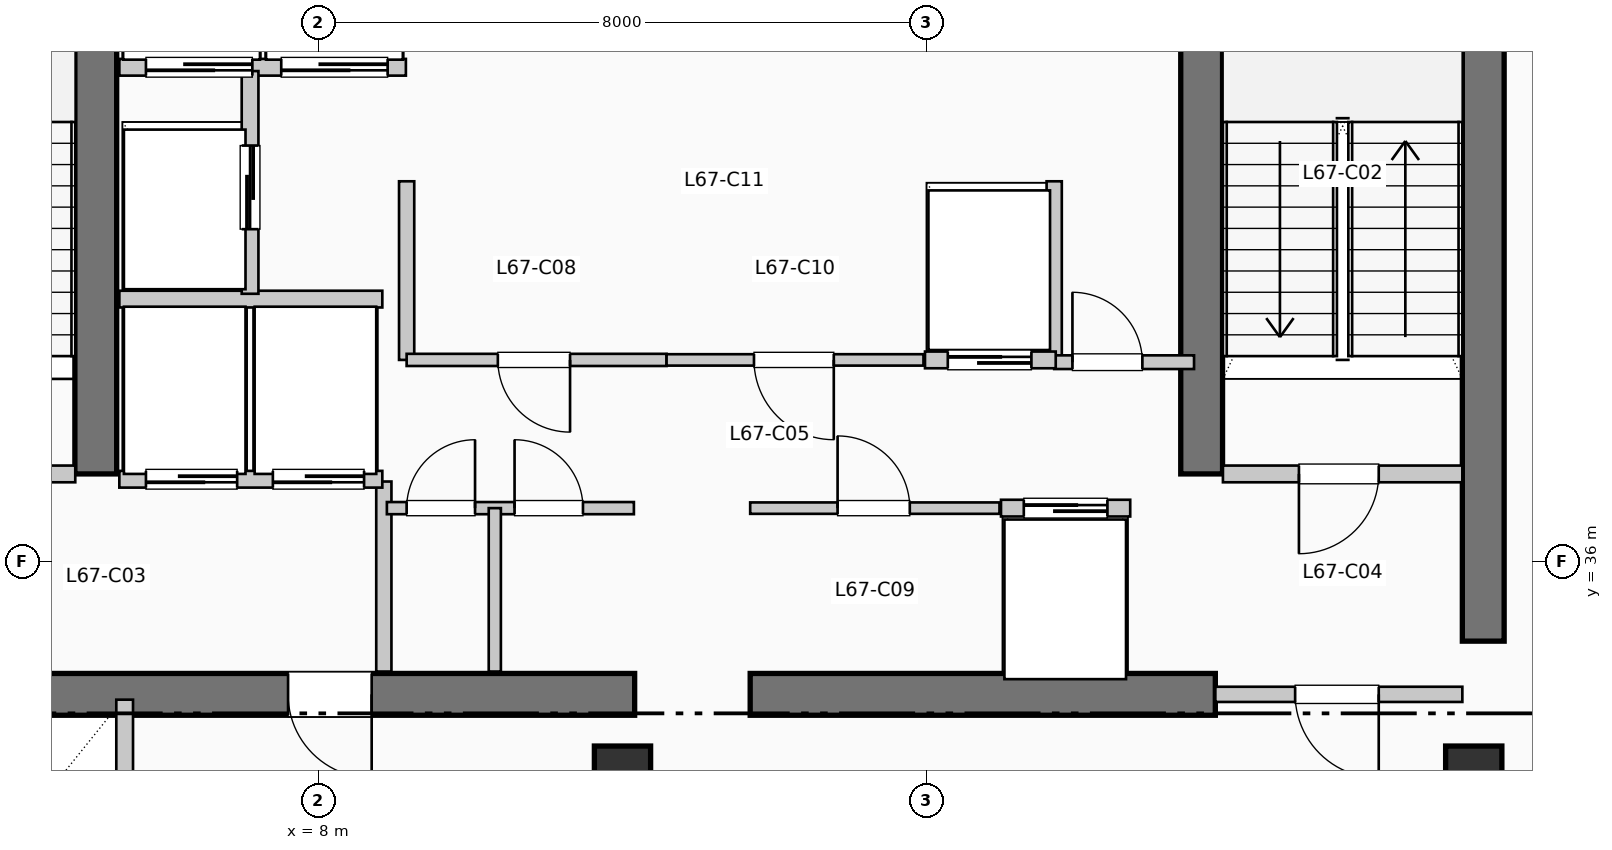
"""IFC4 building model, lengths in metres.
Left out: names, types, materials, properties, quantities, classifications, styles, units other than length and angle.
Written with IfcOpenShell. Run it as: python <this file> out.ifc"""

import sys

from ifc_helpers import new_model, si_unit, direction, frame, frame_2d, origin, origin_2d, place, context, subcontext, project, spatial, rectangle, extrude, element, fill, save


model = new_model("IFC4")
c1 = context("Model", 3, precision=1e-05, world=origin(), true_north=direction((0.0, 1.0)))
c2 = subcontext(c1, "Body", "Model", "MODEL_VIEW")
j1 = project(units=[si_unit("LENGTHUNIT", "METRE"), si_unit("PLANEANGLEUNIT", "RADIAN")], contexts=[c1])
p1 = place(None, origin())
s1 = spatial("IfcSite", under=j1, at=p1, CompositionType="ELEMENT")
p2 = place(p1, origin())
s2 = spatial("IfcBuilding", under=s1, at=p2, CompositionType="ELEMENT")
p3 = place(p2, frame((0.0, 0.0, 276.21)))
s3 = spatial("IfcBuildingStorey", under=s2, at=p3, CompositionType="ELEMENT", Elevation=276.21)
p4 = place(p3, frame((23.325, 34.95, 0.0), z_axis=(0.0, 0.0, 1.0), x_axis=(0.0, 1.0, 0.0)))
e1 = element("IfcWall", 1, at=p4, inside=s3, PredefinedType="SHEAR", context=c2, shape_type="SweptSolid", body=[
    extrude(rectangle(XDim=10.64, YDim=0.55, at=frame_2d((5.32, 0.0))), origin(), (0.0, 0.0, 1.0), 3.96),
])
p5 = place(p3, frame((1.45, 34.25, 0.0), z_axis=(0.0, 0.0, 1.0), x_axis=(1.0, 0.0, 0.0)))
e2 = element("IfcWall", 2, at=p5, inside=s3, PredefinedType="SHEAR", context=c2, shape_type="SweptSolid", body=[
    extrude(rectangle(XDim=10.71, YDim=0.55, at=frame_2d((5.355, 0.0))), origin(), (0.0, 0.0, 1.0), 3.96),
])
p6 = place(p5, frame((7.25, 0.0, 0.0), z_axis=(0.0, 0.0, 1.0), x_axis=(-1.0, 0.0, 0.0)))
e3 = element("IfcOpeningElement", 3, at=p6, cuts=e2, PredefinedType="OPENING", context=c2, shape_type="SweptSolid", body=[
    extrude(rectangle(XDim=1.1, YDim=2.15, at=frame_2d((0.55, 1.075))), frame((0.0, 0.285, 0.0), z_axis=(0.0, -1.0, 0.0), x_axis=(1.0, 0.0, 0.0)), (0.0, 0.0, 1.0), 0.57),
])
p7 = place(p3, frame((13.68, 34.25, 0.0), z_axis=(0.0, 0.0, 1.0), x_axis=(1.0, 0.0, 0.0)))
e4 = element("IfcWall", 4, at=p7, inside=s3, PredefinedType="SHEAR", context=c2, shape_type="SweptSolid", body=[
    extrude(rectangle(XDim=6.12, YDim=0.55, at=frame_2d((3.06, 0.0))), origin(), (0.0, 0.0, 1.0), 3.96),
])
for number, where, z_axis, x_axis in (
    (5, (5.07, 37.15, 0.0), (0.0, 0.0, 1.0), (0.0, 1.0, 0.0)),
    (6, (19.62, 37.15, 0.0), (0.0, 0.0, 1.0), (0.0, 1.0, 0.0)),
):
    element("IfcWall", number, at=place(p3, frame(where, z_axis=z_axis, x_axis=x_axis)), inside=s3, PredefinedType="SHEAR", context=c2, shape_type="SweptSolid", body=[
        extrude(rectangle(XDim=7.89, YDim=0.55, at=frame_2d((3.945, 0.0))), origin(), (0.0, 0.0, 1.0), 3.96),
    ])
for number, where, z_axis, x_axis in (
    (7, (12.0, 33.2, 0.0), (0.0, 0.0, 1.0), (1.0, 0.0, 0.0)),
    (8, (23.2, 33.2, 0.0), (0.0, 0.0, 1.0), (1.0, 0.0, 0.0)),
):
    element("IfcColumn", number, at=place(p3, frame(where, z_axis=z_axis, x_axis=x_axis)), inside=s3, PredefinedType="COLUMN", context=c2, shape_type="SweptSolid", body=[
        extrude(rectangle(XDim=0.74, YDim=0.74, at=origin_2d()), origin(), (0.0, 0.0, 1.0), 3.96),
    ])
p8 = place(p3, frame((1.65, 37.15, 0.0), z_axis=(0.0, 0.0, 1.0), x_axis=(1.0, 0.0, 0.0)))
e9 = element("IfcWall", 9, at=p8, inside=s3, PredefinedType="PARTITIONING", context=c2, shape_type="SweptSolid", body=[
    extrude(rectangle(XDim=3.15, YDim=0.22, at=frame_2d((1.575, 0.0))), origin(), (0.0, 0.0, 1.0), 3.74),
])
p9 = place(p8, frame((2.05, 0.0, 0.0), z_axis=(0.0, 0.0, 1.0), x_axis=(-1.0, 0.0, 0.0)))
e10 = element("IfcOpeningElement", 10, at=p9, cuts=e9, PredefinedType="OPENING", context=c2, shape_type="SweptSolid", body=[
    extrude(rectangle(XDim=1.05, YDim=2.15, at=frame_2d((0.525, 1.075))), frame((0.0, 0.12, 0.0), z_axis=(0.0, -1.0, 0.0), x_axis=(1.0, 0.0, 0.0)), (0.0, 0.0, 1.0), 0.24),
])
p10 = place(p3, frame((8.86, 34.55, 0.0), z_axis=(0.0, 0.0, 1.0), x_axis=(0.0, 1.0, 0.0)))
e11 = element("IfcWall", 11, at=p10, inside=s3, PredefinedType="PARTITIONING", context=c2, shape_type="SweptSolid", body=[
    extrude(rectangle(XDim=2.5, YDim=0.2, at=frame_2d((1.25, 0.0))), origin(), (0.0, 0.0, 1.0), 3.74),
])
p11 = place(p3, frame((19.9, 37.15, 0.0), z_axis=(0.0, 0.0, 1.0), x_axis=(1.0, 0.0, 0.0)))
e12 = element("IfcWall", 12, at=p11, inside=s3, PredefinedType="PARTITIONING", context=c2, shape_type="SweptSolid", body=[
    extrude(rectangle(XDim=3.15, YDim=0.22, at=frame_2d((1.575, 0.0))), origin(), (0.0, 0.0, 1.0), 3.74),
])
p12 = place(p11, frame((2.05, 0.0, 0.0), z_axis=(0.0, 0.0, 1.0), x_axis=(-1.0, 0.0, 0.0)))
e13 = element("IfcOpeningElement", 13, at=p12, cuts=e12, PredefinedType="OPENING", context=c2, shape_type="SweptSolid", body=[
    extrude(rectangle(XDim=1.05, YDim=2.15, at=frame_2d((0.525, 1.075))), frame((0.0, 0.12, 0.0), z_axis=(0.0, -1.0, 0.0), x_axis=(1.0, 0.0, 0.0)), (0.0, 0.0, 1.0), 0.24),
])
p13 = place(p3, frame((19.8, 34.25, 0.0), z_axis=(0.0, 0.0, 1.0), x_axis=(1.0, 0.0, 0.0)))
e14 = element("IfcWall", 14, at=p13, inside=s3, PredefinedType="PARTITIONING", context=c2, shape_type="SweptSolid", body=[
    extrude(rectangle(XDim=3.25, YDim=0.2, at=frame_2d((1.625, 0.0))), origin(), (0.0, 0.0, 1.0), 3.74),
])
p14 = place(p13, frame((2.15, 0.0, 0.0), z_axis=(0.0, 0.0, 1.0), x_axis=(-1.0, 0.0, 0.0)))
e15 = element("IfcOpeningElement", 15, at=p14, cuts=e14, PredefinedType="OPENING", context=c2, shape_type="SweptSolid", body=[
    extrude(rectangle(XDim=1.1, YDim=2.15, at=frame_2d((0.55, 1.075))), frame((0.0, 0.11, 0.0), z_axis=(0.0, -1.0, 0.0), x_axis=(1.0, 0.0, 0.0)), (0.0, 0.0, 1.0), 0.22),
])
p15 = place(p3, frame((5.38, 37.08, 0.0), z_axis=(0.0, 0.0, 1.0), x_axis=(1.0, 0.0, 0.0)))
e16 = element("IfcWall", 16, at=p15, inside=s3, PredefinedType="PARTITIONING", context=c2, shape_type="SweptSolid", body=[
    extrude(rectangle(XDim=3.46, YDim=0.22, at=frame_2d((1.73, 0.0))), origin(), (0.0, 0.0, 1.0), 3.74),
])
p16 = place(p15, frame((1.55, 0.0, 0.0), z_axis=(0.0, 0.0, 1.0), x_axis=(-1.0, 0.0, 0.0)))
e17 = element("IfcOpeningElement", 17, at=p16, cuts=e16, PredefinedType="OPENING", context=c2, shape_type="SweptSolid", body=[
    extrude(rectangle(XDim=1.2, YDim=2.2, at=frame_2d((0.6, 1.1))), frame((0.0, 0.12, 0.0), z_axis=(0.0, -1.0, 0.0), x_axis=(1.0, 0.0, 0.0)), (0.0, 0.0, 1.0), 0.24),
])
p17 = place(p15, frame((3.22, 0.0, 0.0), z_axis=(0.0, 0.0, 1.0), x_axis=(-1.0, 0.0, 0.0)))
e18 = element("IfcOpeningElement", 18, at=p17, cuts=e16, PredefinedType="OPENING", context=c2, shape_type="SweptSolid", body=[
    extrude(rectangle(XDim=1.2, YDim=2.2, at=frame_2d((0.6, 1.1))), frame((0.0, 0.12, 0.0), z_axis=(0.0, -1.0, 0.0), x_axis=(1.0, 0.0, 0.0)), (0.0, 0.0, 1.0), 0.24),
])
p18 = place(p3, frame((5.38, 39.45, 0.0), z_axis=(0.0, 0.0, 1.0), x_axis=(1.0, 0.0, 0.0)))
e19 = element("IfcWall", 19, at=p18, inside=s3, PredefinedType="PARTITIONING", context=c2, shape_type="SweptSolid", body=[
    extrude(rectangle(XDim=3.46, YDim=0.22, at=frame_2d((1.73, 0.0))), origin(), (0.0, 0.0, 1.0), 3.74),
])
p19 = place(p3, frame((5.38, 42.5, 0.0), z_axis=(0.0, 0.0, 1.0), x_axis=(1.0, 0.0, 0.0)))
e20 = element("IfcWall", 20, at=p19, inside=s3, PredefinedType="PARTITIONING", context=c2, shape_type="SweptSolid", body=[
    extrude(rectangle(XDim=3.77, YDim=0.22, at=frame_2d((1.885, 0.0))), origin(), (0.0, 0.0, 1.0), 3.74),
])
p20 = place(p19, frame((1.75, 0.0, 0.0), z_axis=(0.0, 0.0, 1.0), x_axis=(-1.0, 0.0, 0.0)))
e21 = element("IfcOpeningElement", 21, at=p20, cuts=e20, PredefinedType="OPENING", context=c2, shape_type="SweptSolid", body=[
    extrude(rectangle(XDim=1.4, YDim=2.2, at=frame_2d((0.7, 1.1))), frame((0.0, 0.12, 0.0), z_axis=(0.0, -1.0, 0.0), x_axis=(1.0, 0.0, 0.0)), (0.0, 0.0, 1.0), 0.24),
])
p21 = place(p19, frame((3.53, 0.0, 0.0), z_axis=(0.0, 0.0, 1.0), x_axis=(-1.0, 0.0, 0.0)))
e22 = element("IfcOpeningElement", 22, at=p21, cuts=e20, PredefinedType="OPENING", context=c2, shape_type="SweptSolid", body=[
    extrude(rectangle(XDim=1.4, YDim=2.2, at=frame_2d((0.7, 1.1))), frame((0.0, 0.12, 0.0), z_axis=(0.0, -1.0, 0.0), x_axis=(1.0, 0.0, 0.0)), (0.0, 0.0, 1.0), 0.24),
])
p22 = place(p3, frame((7.1, 39.52, 0.0), z_axis=(0.0, 0.0, 1.0), x_axis=(0.0, 1.0, 0.0)))
e23 = element("IfcWall", 23, at=p22, inside=s3, PredefinedType="PARTITIONING", context=c2, shape_type="SweptSolid", body=[
    extrude(rectangle(XDim=2.93, YDim=0.22, at=frame_2d((1.465, 0.0))), origin(), (0.0, 0.0, 1.0), 3.74),
])
p23 = place(p22, frame((0.85, 0.0, 0.0)))
e24 = element("IfcOpeningElement", 24, at=p23, cuts=e23, PredefinedType="OPENING", context=c2, shape_type="SweptSolid", body=[
    extrude(rectangle(XDim=1.1, YDim=2.2, at=frame_2d((0.55, 1.1))), frame((0.0, 0.12, 0.0), z_axis=(0.0, -1.0, 0.0), x_axis=(1.0, 0.0, 0.0)), (0.0, 0.0, 1.0), 0.24),
])
p24 = place(p3, frame((5.45, 31.8, 0.0), z_axis=(0.0, 0.0, 1.0), x_axis=(0.0, 1.0, 0.0)))
e25 = element("IfcWall", 25, at=p24, inside=s3, PredefinedType="PARTITIONING", context=c2, shape_type="SweptSolid", body=[
    extrude(rectangle(XDim=2.38, YDim=0.22, at=frame_2d((1.19, 0.0))), origin(), (0.0, 0.0, 1.0), 3.74),
])
for number, where, z_axis, x_axis in (
    (26, (9.16, 38.65, 0.0), (0.0, 0.0, 1.0), (0.0, 1.0, 0.0)),
    (27, (17.68, 38.65, 0.0), (0.0, 0.0, 1.0), (0.0, 1.0, 0.0)),
):
    element("IfcWall", number, at=place(p3, frame(where, z_axis=z_axis, x_axis=x_axis)), inside=s3, PredefinedType="PARTITIONING", context=c2, shape_type="SweptSolid", body=[
        extrude(rectangle(XDim=2.35, YDim=0.2, at=frame_2d((1.175, 0.0))), origin(), (0.0, 0.0, 1.0), 3.74),
    ])
p25 = place(p3, frame((17.68, 38.62, 0.0), z_axis=(0.0, 0.0, 1.0), x_axis=(1.0, 0.0, 0.0)))
e28 = element("IfcWall", 28, at=p25, inside=s3, PredefinedType="PARTITIONING", context=c2, shape_type="SweptSolid", body=[
    extrude(rectangle(XDim=1.84, YDim=0.18, at=frame_2d((0.92, 0.0))), origin(), (0.0, 0.0, 1.0), 3.74),
])
p26 = place(p25, frame((0.24, 0.0, 0.0)))
e29 = element("IfcOpeningElement", 29, at=p26, cuts=e28, PredefinedType="OPENING", context=c2, shape_type="SweptSolid", body=[
    extrude(rectangle(XDim=0.92, YDim=2.1, at=frame_2d((0.46, 1.05))), frame((0.0, 0.1, 0.0), z_axis=(0.0, -1.0, 0.0), x_axis=(1.0, 0.0, 0.0)), (0.0, 0.0, 1.0), 0.2),
])
p27 = place(p3, frame((8.9, 36.7, 0.0), z_axis=(0.0, 0.0, 1.0), x_axis=(1.0, 0.0, 0.0)))
e30 = element("IfcWall", 30, at=p27, inside=s3, PredefinedType="PARTITIONING", context=c2, shape_type="SweptSolid", body=[
    extrude(rectangle(XDim=3.25, YDim=0.16, at=frame_2d((1.625, 0.0))), origin(), (0.0, 0.0, 1.0), 3.74),
])
p28 = place(p27, frame((0.26, 0.0, 0.0)))
e31 = element("IfcOpeningElement", 31, at=p28, cuts=e30, PredefinedType="OPENING", context=c2, shape_type="SweptSolid", body=[
    extrude(rectangle(XDim=0.9, YDim=2.15, at=frame_2d((0.45, 1.075))), frame((0.0, 0.09, 0.0), z_axis=(0.0, -1.0, 0.0), x_axis=(1.0, 0.0, 0.0)), (0.0, 0.0, 1.0), 0.18),
])
p29 = place(p27, frame((1.68, 0.0, 0.0)))
e32 = element("IfcOpeningElement", 32, at=p29, cuts=e30, PredefinedType="OPENING", context=c2, shape_type="SweptSolid", body=[
    extrude(rectangle(XDim=0.9, YDim=2.15, at=frame_2d((0.45, 1.075))), frame((0.0, 0.09, 0.0), z_axis=(0.0, -1.0, 0.0), x_axis=(1.0, 0.0, 0.0)), (0.0, 0.0, 1.0), 0.18),
])
p30 = place(p3, frame((10.32, 34.55, 0.0), z_axis=(0.0, 0.0, 1.0), x_axis=(0.0, 1.0, 0.0)))
e33 = element("IfcWall", 33, at=p30, inside=s3, PredefinedType="PARTITIONING", context=c2, shape_type="SweptSolid", body=[
    extrude(rectangle(XDim=2.15, YDim=0.16, at=frame_2d((1.075, 0.0))), origin(), (0.0, 0.0, 1.0), 3.74),
])
p31 = place(p3, frame((9.16, 38.65, 0.0), z_axis=(0.0, 0.0, 1.0), x_axis=(1.0, 0.0, 0.0)))
e34 = element("IfcWall", 34, at=p31, inside=s3, PredefinedType="PARTITIONING", context=c2, shape_type="SweptSolid", body=[
    extrude(rectangle(XDim=3.42, YDim=0.16, at=frame_2d((1.71, 0.0))), origin(), (0.0, 0.0, 1.0), 3.74),
])
p32 = place(p31, frame((2.15, 0.0, 0.0), z_axis=(0.0, 0.0, 1.0), x_axis=(-1.0, 0.0, 0.0)))
e35 = element("IfcOpeningElement", 35, at=p32, cuts=e34, PredefinedType="OPENING", context=c2, shape_type="SweptSolid", body=[
    extrude(rectangle(XDim=0.95, YDim=2.15, at=frame_2d((0.475, 1.075))), frame((0.0, 0.09, 0.0), z_axis=(0.0, -1.0, 0.0), x_axis=(1.0, 0.0, 0.0)), (0.0, 0.0, 1.0), 0.18),
])
p33 = place(p3, frame((13.68, 36.7, 0.0), z_axis=(0.0, 0.0, 1.0), x_axis=(1.0, 0.0, 0.0)))
e36 = element("IfcWall", 36, at=p33, inside=s3, PredefinedType="PARTITIONING", context=c2, shape_type="SweptSolid", body=[
    extrude(rectangle(XDim=3.28, YDim=0.15, at=frame_2d((1.64, 0.0))), origin(), (0.0, 0.0, 1.0), 3.74),
])
p34 = place(p33, frame((1.15, 0.0, 0.0)))
e37 = element("IfcOpeningElement", 37, at=p34, cuts=e36, PredefinedType="OPENING", context=c2, shape_type="SweptSolid", body=[
    extrude(rectangle(XDim=0.95, YDim=2.15, at=frame_2d((0.475, 1.075))), frame((0.0, 0.085, 0.0), z_axis=(0.0, -1.0, 0.0), x_axis=(1.0, 0.0, 0.0)), (0.0, 0.0, 1.0), 0.17),
])
p35 = place(p3, frame((12.58, 38.65, 0.0), z_axis=(0.0, 0.0, 1.0), x_axis=(1.0, 0.0, 0.0)))
e38 = element("IfcWall", 38, at=p35, inside=s3, PredefinedType="PARTITIONING", context=c2, shape_type="SweptSolid", body=[
    extrude(rectangle(XDim=3.38, YDim=0.15, at=frame_2d((1.69, 0.0))), origin(), (0.0, 0.0, 1.0), 3.74),
])
p36 = place(p35, frame((2.2, 0.0, 0.0), z_axis=(0.0, 0.0, 1.0), x_axis=(-1.0, 0.0, 0.0)))
e39 = element("IfcOpeningElement", 39, at=p36, cuts=e38, PredefinedType="OPENING", context=c2, shape_type="SweptSolid", body=[
    extrude(rectangle(XDim=1.05, YDim=2.15, at=frame_2d((0.525, 1.075))), frame((0.0, 0.085, 0.0), z_axis=(0.0, -1.0, 0.0), x_axis=(1.0, 0.0, 0.0)), (0.0, 0.0, 1.0), 0.17),
])
p37 = place(p3, frame((16.98, 36.7, 0.0), z_axis=(0.0, 0.0, 1.0), x_axis=(1.0, 0.0, 0.0)))
e40 = element("IfcWall", 40, at=p37, inside=s3, PredefinedType="PARTITIONING", context=c2, shape_type="SweptSolid", body=[
    extrude(rectangle(XDim=1.7, YDim=0.22, at=frame_2d((0.85, 0.0))), origin(), (0.0, 0.0, 1.0), 3.74),
])
p38 = place(p37, frame((0.3, 0.0, 0.0)))
e41 = element("IfcOpeningElement", 41, at=p38, cuts=e40, PredefinedType="OPENING", context=c2, shape_type="SweptSolid", body=[
    extrude(rectangle(XDim=1.1, YDim=2.2, at=frame_2d((0.55, 1.1))), frame((0.0, 0.12, 0.0), z_axis=(0.0, -1.0, 0.0), x_axis=(1.0, 0.0, 0.0)), (0.0, 0.0, 1.0), 0.24),
])
p39 = place(p3, frame((15.98, 38.65, 0.0), z_axis=(0.0, 0.0, 1.0), x_axis=(1.0, 0.0, 0.0)))
e42 = element("IfcWall", 42, at=p39, inside=s3, PredefinedType="PARTITIONING", context=c2, shape_type="SweptSolid", body=[
    extrude(rectangle(XDim=1.72, YDim=0.22, at=frame_2d((0.86, 0.0))), origin(), (0.0, 0.0, 1.0), 3.74),
])
p40 = place(p39, frame((0.3, 0.0, 0.0)))
e43 = element("IfcOpeningElement", 43, at=p40, cuts=e42, PredefinedType="OPENING", context=c2, shape_type="SweptSolid", body=[
    extrude(rectangle(XDim=1.1, YDim=2.2, at=frame_2d((0.55, 1.1))), frame((0.0, 0.12, 0.0), z_axis=(0.0, -1.0, 0.0), x_axis=(1.0, 0.0, 0.0)), (0.0, 0.0, 1.0), 0.24),
])
p41 = place(p6, origin())
e44 = element("IfcDoor", 44, at=p41, inside=s3, OperationType="SINGLE_SWING_RIGHT", PredefinedType="DOOR", context=c2, shape_type="SweptSolid", body=[
    extrude(rectangle(XDim=1.1, YDim=2.15, at=frame_2d((0.55, 1.075))), frame((0.0, 0.025, 0.0), z_axis=(0.0, -1.0, 0.0), x_axis=(1.0, 0.0, 0.0)), (0.0, 0.0, 1.0), 0.05),
])
fill(e3, e44)
p42 = place(p12, origin())
e45 = element("IfcDoor", 45, at=p42, inside=s3, OperationType="SINGLE_SWING_LEFT", PredefinedType="DOOR", context=c2, shape_type="SweptSolid", body=[
    extrude(rectangle(XDim=1.05, YDim=2.15, at=frame_2d((0.525, 1.075))), frame((0.0, 0.025, 0.0), z_axis=(0.0, -1.0, 0.0), x_axis=(1.0, 0.0, 0.0)), (0.0, 0.0, 1.0), 0.05),
])
fill(e13, e45)
p43 = place(p14, origin())
e46 = element("IfcDoor", 46, at=p43, inside=s3, OperationType="SINGLE_SWING_RIGHT", PredefinedType="DOOR", context=c2, shape_type="SweptSolid", body=[
    extrude(rectangle(XDim=1.1, YDim=2.15, at=frame_2d((0.55, 1.075))), frame((0.0, 0.025, 0.0), z_axis=(0.0, -1.0, 0.0), x_axis=(1.0, 0.0, 0.0)), (0.0, 0.0, 1.0), 0.05),
])
fill(e15, e46)
p44 = place(p16, origin())
e47 = element("IfcDoor", 47, at=p44, inside=s3, OperationType="SLIDING_TO_RIGHT", PredefinedType="DOOR", context=c2, shape_type="SweptSolid", body=[
    extrude(rectangle(XDim=1.2, YDim=2.2, at=frame_2d((0.6, 1.1))), frame((0.0, 0.025, 0.0), z_axis=(0.0, -1.0, 0.0), x_axis=(1.0, 0.0, 0.0)), (0.0, 0.0, 1.0), 0.05),
])
fill(e17, e47)
p45 = place(p17, origin())
e48 = element("IfcDoor", 48, at=p45, inside=s3, OperationType="SLIDING_TO_RIGHT", PredefinedType="DOOR", context=c2, shape_type="SweptSolid", body=[
    extrude(rectangle(XDim=1.2, YDim=2.2, at=frame_2d((0.6, 1.1))), frame((0.0, 0.025, 0.0), z_axis=(0.0, -1.0, 0.0), x_axis=(1.0, 0.0, 0.0)), (0.0, 0.0, 1.0), 0.05),
])
fill(e18, e48)
p46 = place(p20, origin())
e49 = element("IfcDoor", 49, at=p46, inside=s3, OperationType="SLIDING_TO_LEFT", PredefinedType="DOOR", context=c2, shape_type="SweptSolid", body=[
    extrude(rectangle(XDim=1.4, YDim=2.2, at=frame_2d((0.7, 1.1))), frame((0.0, 0.025, 0.0), z_axis=(0.0, -1.0, 0.0), x_axis=(1.0, 0.0, 0.0)), (0.0, 0.0, 1.0), 0.05),
])
fill(e21, e49)
p47 = place(p21, origin())
e50 = element("IfcDoor", 50, at=p47, inside=s3, OperationType="SLIDING_TO_LEFT", PredefinedType="DOOR", context=c2, shape_type="SweptSolid", body=[
    extrude(rectangle(XDim=1.4, YDim=2.2, at=frame_2d((0.7, 1.1))), frame((0.0, 0.025, 0.0), z_axis=(0.0, -1.0, 0.0), x_axis=(1.0, 0.0, 0.0)), (0.0, 0.0, 1.0), 0.05),
])
fill(e22, e50)
p48 = place(p23, origin())
e51 = element("IfcDoor", 51, at=p48, inside=s3, OperationType="SLIDING_TO_LEFT", PredefinedType="DOOR", context=c2, shape_type="SweptSolid", body=[
    extrude(rectangle(XDim=1.1, YDim=2.2, at=frame_2d((0.55, 1.1))), frame((0.0, 0.025, 0.0), z_axis=(0.0, -1.0, 0.0), x_axis=(1.0, 0.0, 0.0)), (0.0, 0.0, 1.0), 0.05),
])
fill(e24, e51)
p49 = place(p26, origin())
e52 = element("IfcDoor", 52, at=p49, inside=s3, OperationType="SINGLE_SWING_LEFT", PredefinedType="DOOR", context=c2, shape_type="SweptSolid", body=[
    extrude(rectangle(XDim=0.92, YDim=2.1, at=frame_2d((0.46, 1.05))), frame((0.0, 0.025, 0.0), z_axis=(0.0, -1.0, 0.0), x_axis=(1.0, 0.0, 0.0)), (0.0, 0.0, 1.0), 0.05),
])
fill(e29, e52)
p50 = place(p28, origin())
e53 = element("IfcDoor", 53, at=p50, inside=s3, OperationType="SINGLE_SWING_RIGHT", PredefinedType="DOOR", context=c2, shape_type="SweptSolid", body=[
    extrude(rectangle(XDim=0.9, YDim=2.15, at=frame_2d((0.45, 1.075))), frame((0.0, 0.025, 0.0), z_axis=(0.0, -1.0, 0.0), x_axis=(1.0, 0.0, 0.0)), (0.0, 0.0, 1.0), 0.05),
])
fill(e31, e53)
p51 = place(p29, origin())
e54 = element("IfcDoor", 54, at=p51, inside=s3, OperationType="SINGLE_SWING_LEFT", PredefinedType="DOOR", context=c2, shape_type="SweptSolid", body=[
    extrude(rectangle(XDim=0.9, YDim=2.15, at=frame_2d((0.45, 1.075))), frame((0.0, 0.025, 0.0), z_axis=(0.0, -1.0, 0.0), x_axis=(1.0, 0.0, 0.0)), (0.0, 0.0, 1.0), 0.05),
])
fill(e32, e54)
p52 = place(p32, origin())
e55 = element("IfcDoor", 55, at=p52, inside=s3, OperationType="SINGLE_SWING_RIGHT", PredefinedType="DOOR", context=c2, shape_type="SweptSolid", body=[
    extrude(rectangle(XDim=0.95, YDim=2.15, at=frame_2d((0.475, 1.075))), frame((0.0, 0.025, 0.0), z_axis=(0.0, -1.0, 0.0), x_axis=(1.0, 0.0, 0.0)), (0.0, 0.0, 1.0), 0.05),
])
fill(e35, e55)
p53 = place(p34, origin())
e56 = element("IfcDoor", 56, at=p53, inside=s3, OperationType="SINGLE_SWING_LEFT", PredefinedType="DOOR", context=c2, shape_type="SweptSolid", body=[
    extrude(rectangle(XDim=0.95, YDim=2.15, at=frame_2d((0.475, 1.075))), frame((0.0, 0.025, 0.0), z_axis=(0.0, -1.0, 0.0), x_axis=(1.0, 0.0, 0.0)), (0.0, 0.0, 1.0), 0.05),
])
fill(e37, e56)
p54 = place(p36, origin())
e57 = element("IfcDoor", 57, at=p54, inside=s3, OperationType="SINGLE_SWING_RIGHT", PredefinedType="DOOR", context=c2, shape_type="SweptSolid", body=[
    extrude(rectangle(XDim=1.05, YDim=2.15, at=frame_2d((0.525, 1.075))), frame((0.0, 0.025, 0.0), z_axis=(0.0, -1.0, 0.0), x_axis=(1.0, 0.0, 0.0)), (0.0, 0.0, 1.0), 0.05),
])
fill(e39, e57)
p55 = place(p38, origin())
e58 = element("IfcDoor", 58, at=p55, inside=s3, OperationType="SLIDING_TO_LEFT", PredefinedType="DOOR", context=c2, shape_type="SweptSolid", body=[
    extrude(rectangle(XDim=1.1, YDim=2.2, at=frame_2d((0.55, 1.1))), frame((0.0, 0.025, 0.0), z_axis=(0.0, -1.0, 0.0), x_axis=(1.0, 0.0, 0.0)), (0.0, 0.0, 1.0), 0.05),
])
fill(e41, e58)
p56 = place(p40, origin())
e59 = element("IfcDoor", 59, at=p56, inside=s3, OperationType="SLIDING_TO_LEFT", PredefinedType="DOOR", context=c2, shape_type="SweptSolid", body=[
    extrude(rectangle(XDim=1.1, YDim=2.2, at=frame_2d((0.55, 1.1))), frame((0.0, 0.025, 0.0), z_axis=(0.0, -1.0, 0.0), x_axis=(1.0, 0.0, 0.0)), (0.0, 0.0, 1.0), 0.05),
])
fill(e43, e59)
save(model, sys.argv[1])
